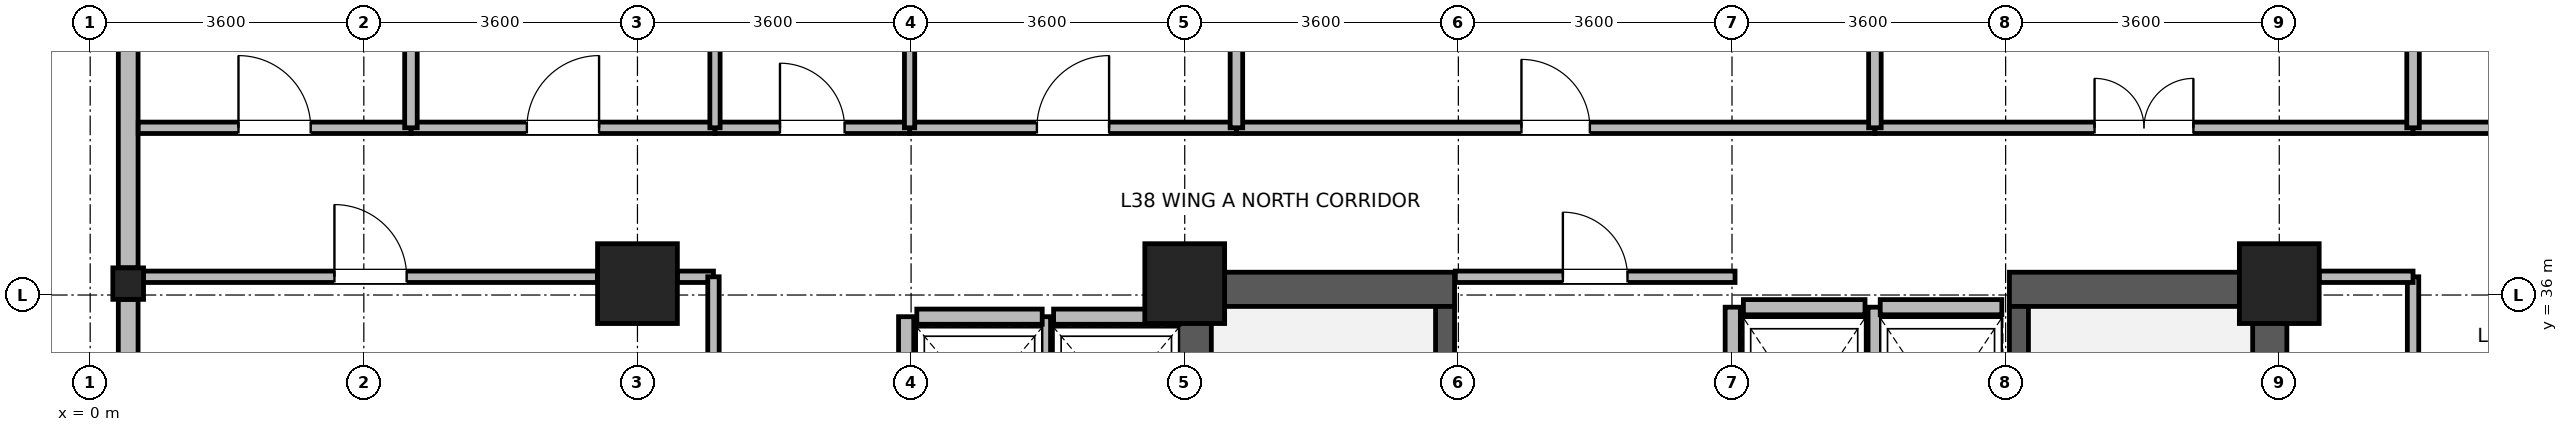
"""IFC4 building model, lengths in metres.
Left out: names, types, materials, properties, quantities, classifications, styles, units other than length and angle.
Written with IfcOpenShell. Run it as: python <this file> out.ifc"""

import sys

from ifc_helpers import new_model, si_unit, direction, frame, frame_2d, origin, origin_2d, place, context, subcontext, project, spatial, rectangle, i_section, extrude, source, transform, mapped, element, fill, save


model = new_model("IFC4")
c1 = context("Model", 3, precision=1e-05, world=origin(), true_north=direction((0.0, 1.0)))
c2 = subcontext(c1, "Body", "Model", "MODEL_VIEW")
j1 = project(units=[si_unit("LENGTHUNIT", "METRE"), si_unit("PLANEANGLEUNIT", "RADIAN")], contexts=[c1])
p1 = place(None, origin())
s1 = spatial("IfcSite", under=j1, at=p1, CompositionType="ELEMENT")
p2 = place(p1, origin())
s2 = spatial("IfcBuilding", under=s1, at=p2, CompositionType="ELEMENT")
p3 = place(p2, frame((0.0, 0.0, 151.3)))
s3 = spatial("IfcBuildingStorey", under=s2, at=p3, CompositionType="ELEMENT", Elevation=151.3)
for number, where, z_axis, x_axis in (
    (1, (14.525, 28.4, 0.0), (0.0, 0.0, 1.0), (0.0, 1.0, 0.0)),
    (2, (28.675, 28.4, 0.0), (0.0, 0.0, 1.0), (0.0, 1.0, 0.0)),
):
    element("IfcWall", number, at=place(p3, frame(where, z_axis=z_axis, x_axis=x_axis)), inside=s3, PredefinedType="SHEAR", context=c2, shape_type="SweptSolid", body=[
        extrude(rectangle(XDim=7.9, YDim=0.45, at=frame_2d((3.95, 0.0))), origin(), (0.0, 0.0, 1.0), 3.46),
    ])
for number, where, z_axis, x_axis in (
    (3, (14.75, 36.075, 0.0), (0.0, 0.0, 1.0), (1.0, 0.0, 0.0)),
    (4, (25.25, 36.075, 0.0), (0.0, 0.0, 1.0), (1.0, 0.0, 0.0)),
):
    element("IfcWall", number, at=place(p3, frame(where, z_axis=z_axis, x_axis=x_axis)), inside=s3, PredefinedType="SHEAR", context=c2, shape_type="SweptSolid", body=[
        extrude(rectangle(XDim=3.2, YDim=0.45, at=frame_2d((1.6, 0.0))), origin(), (0.0, 0.0, 1.0), 3.46),
    ])
p4 = place(p3, frame((17.825, 28.85, 0.0), z_axis=(0.0, 0.0, 1.0), x_axis=(0.0, 1.0, 0.0)))
e5 = element("IfcWall", 5, at=p4, inside=s3, PredefinedType="SHEAR", context=c2, shape_type="SweptSolid", body=[
    extrude(rectangle(XDim=7.0, YDim=0.25, at=frame_2d((3.5, 0.0))), origin(), (0.0, 0.0, 1.0), 3.46),
])
p5 = place(p4, frame((0.15, 0.0, 0.0)))
e6 = element("IfcOpeningElement", 6, at=p5, cuts=e5, PredefinedType="OPENING", context=c2, shape_type="SweptSolid", body=[
    extrude(rectangle(XDim=1.1, YDim=2.08, at=frame_2d((0.55, 1.04))), frame((0.0, 0.135, 0.0), z_axis=(0.0, -1.0, 0.0), x_axis=(1.0, 0.0, 0.0)), (0.0, 0.0, 1.0), 0.27),
])
p6 = place(p3, frame((25.375, 28.85, 0.0), z_axis=(0.0, 0.0, 1.0), x_axis=(0.0, 1.0, 0.0)))
e7 = element("IfcWall", 7, at=p6, inside=s3, PredefinedType="SHEAR", context=c2, shape_type="SweptSolid", body=[
    extrude(rectangle(XDim=7.0, YDim=0.25, at=frame_2d((3.5, 0.0))), origin(), (0.0, 0.0, 1.0), 3.46),
])
p7 = place(p6, frame((0.15, 0.0, 0.0)))
e8 = element("IfcOpeningElement", 8, at=p7, cuts=e7, PredefinedType="OPENING", context=c2, shape_type="SweptSolid", body=[
    extrude(rectangle(XDim=1.1, YDim=2.08, at=frame_2d((0.55, 1.04))), frame((0.0, 0.135, 0.0), z_axis=(0.0, -1.0, 0.0), x_axis=(1.0, 0.0, 0.0)), (0.0, 0.0, 1.0), 0.27),
])
m1 = source(origin(), c2, "Body", "SweptSolid", [
    extrude(rectangle(XDim=1.05, YDim=1.05, at=origin_2d()), origin(), (0.0, 0.0, 1.0), 3.7),
])
for number, where, z_axis, x_axis in (
    (9, (7.2, 36.15, 0.0), (0.0, 0.0, 1.0), (1.0, 0.0, 0.0)),
    (10, (14.4, 36.15, 0.0), (0.0, 0.0, 1.0), (1.0, 0.0, 0.0)),
    (11, (28.8, 36.15, 0.0), (0.0, 0.0, 1.0), (1.0, 0.0, 0.0)),
):
    element("IfcColumn", number, at=place(p3, frame(where, z_axis=z_axis, x_axis=x_axis)), inside=s3, PredefinedType="COLUMN", context=c2, shape_type="MappedRepresentation", body=[
        mapped(m1, transform((0.0, 0.0, 0.0), x_axis=(1.0, 0.0, 0.0), y_axis=(0.0, 1.0, 0.0), z_axis=(0.0, 0.0, 1.0), scale=1.0)),
    ])
m2 = source(origin(), c2, "Body", "SweptSolid", [
    extrude(i_section(OverallWidth=0.404, OverallDepth=0.414, WebThickness=0.021, FlangeThickness=0.028, FilletRadius=0.015, at=origin_2d()), origin(), (0.0, 0.0, 1.0), 3.7),
])
p8 = place(p3, frame((0.5, 36.15, 0.0), z_axis=(0.0, 0.0, 1.0), x_axis=(1.0, 0.0, 0.0)))
e12 = element("IfcColumn", 12, at=p8, inside=s3, PredefinedType="COLUMN", context=c2, shape_type="MappedRepresentation", body=[
    mapped(m2, transform((0.0, 0.0, 0.0), x_axis=(1.0, 0.0, 0.0), y_axis=(0.0, 1.0, 0.0), z_axis=(0.0, 0.0, 1.0), scale=1.0)),
])
p9 = place(p3, frame((0.5, 36.358, 0.0), z_axis=(0.0, 0.0, 1.0), x_axis=(0.0, 1.0, 0.0)))
e13 = element("IfcWall", 13, at=p9, inside=s3, PredefinedType="STANDARD", context=c2, shape_type="SweptSolid", body=[
    extrude(rectangle(XDim=6.972, YDim=0.26, at=frame_2d((3.486, 0.0))), origin(), (0.0, 0.0, 1.0), 3.44),
])
p10 = place(p9, frame((4.329, 0.0, 0.85)))
e14 = element("IfcOpeningElement", 14, at=p10, cuts=e13, PredefinedType="OPENING", context=c2, shape_type="SweptSolid", body=[
    extrude(rectangle(XDim=1.8, YDim=1.85, at=frame_2d((0.9, 0.925))), frame((0.0, 0.14, 0.0), z_axis=(0.0, -1.0, 0.0), x_axis=(1.0, 0.0, 0.0)), (0.0, 0.0, 1.0), 0.28),
])
p11 = place(p9, frame((3.011, 0.0, 0.85)))
e15 = element("IfcOpeningElement", 15, at=p11, cuts=e13, PredefinedType="OPENING", context=c2, shape_type="SweptSolid", body=[
    extrude(rectangle(XDim=0.95, YDim=1.75, at=frame_2d((0.475, 0.875))), frame((0.0, 0.14, 0.0), z_axis=(0.0, -1.0, 0.0), x_axis=(1.0, 0.0, 0.0)), (0.0, 0.0, 1.0), 0.28),
])
p12 = place(p3, frame((0.5, 28.858, 0.0), z_axis=(0.0, 0.0, 1.0), x_axis=(0.0, 1.0, 0.0)))
e16 = element("IfcWall", 16, at=p12, inside=s3, PredefinedType="STANDARD", context=c2, shape_type="SweptSolid", body=[
    extrude(rectangle(XDim=7.084, YDim=0.26, at=frame_2d((3.542, 0.0))), origin(), (0.0, 0.0, 1.0), 2.99),
])
p13 = place(p12, frame((0.871, 0.0, 0.85)))
e17 = element("IfcOpeningElement", 17, at=p13, cuts=e16, PredefinedType="OPENING", context=c2, shape_type="SweptSolid", body=[
    extrude(rectangle(XDim=1.8, YDim=1.85, at=frame_2d((0.9, 0.925))), frame((0.0, 0.14, 0.0), z_axis=(0.0, -1.0, 0.0), x_axis=(1.0, 0.0, 0.0)), (0.0, 0.0, 1.0), 0.28),
])
p14 = place(p12, frame((4.413, 0.0, 0.85)))
e18 = element("IfcOpeningElement", 18, at=p14, cuts=e16, PredefinedType="OPENING", context=c2, shape_type="SweptSolid", body=[
    extrude(rectangle(XDim=1.8, YDim=1.85, at=frame_2d((0.9, 0.925))), frame((0.0, 0.14, 0.0), z_axis=(0.0, -1.0, 0.0), x_axis=(1.0, 0.0, 0.0)), (0.0, 0.0, 1.0), 0.28),
])
p15 = place(p3, frame((12.675, 35.715, 0.0), z_axis=(0.0, 0.0, 1.0), x_axis=(1.0, 0.0, 0.0)))
e19 = element("IfcWall", 19, at=p15, inside=s3, PredefinedType="PARTITIONING", context=c2, shape_type="SweptSolid", body=[
    extrude(rectangle(XDim=1.65, YDim=0.2, at=frame_2d((0.825, 0.0))), origin(), (0.0, 0.0, 1.0), 3.44),
])
p16 = place(p3, frame((12.535, 33.485, 0.0), z_axis=(0.0, 0.0, 1.0), x_axis=(0.0, 1.0, 0.0)))
e20 = element("IfcWall", 20, at=p16, inside=s3, PredefinedType="PARTITIONING", context=c2, shape_type="SweptSolid", body=[
    extrude(rectangle(XDim=2.23, YDim=0.2, at=frame_2d((1.115, 0.0))), origin(), (0.0, 0.0, 1.0), 3.44),
])
p17 = place(p3, frame((10.875, 35.715, 0.0), z_axis=(0.0, 0.0, 1.0), x_axis=(1.0, 0.0, 0.0)))
e21 = element("IfcWall", 21, at=p17, inside=s3, PredefinedType="PARTITIONING", context=c2, shape_type="SweptSolid", body=[
    extrude(rectangle(XDim=1.65, YDim=0.2, at=frame_2d((0.825, 0.0))), origin(), (0.0, 0.0, 1.0), 3.44),
])
p18 = place(p3, frame((10.735, 33.485, 0.0), z_axis=(0.0, 0.0, 1.0), x_axis=(0.0, 1.0, 0.0)))
e22 = element("IfcWall", 22, at=p18, inside=s3, PredefinedType="PARTITIONING", context=c2, shape_type="SweptSolid", body=[
    extrude(rectangle(XDim=2.23, YDim=0.2, at=frame_2d((1.115, 0.0))), origin(), (0.0, 0.0, 1.0), 3.44),
])
p19 = place(p3, frame((21.75, 35.84, 0.0), z_axis=(0.0, 0.0, 1.0), x_axis=(1.0, 0.0, 0.0)))
e23 = element("IfcWall", 23, at=p19, inside=s3, PredefinedType="PARTITIONING", context=c2, shape_type="SweptSolid", body=[
    extrude(rectangle(XDim=1.6, YDim=0.2, at=frame_2d((0.8, 0.0))), origin(), (0.0, 0.0, 1.0), 2.44),
])
for number, where, z_axis, x_axis in (
    (24, (21.61, 33.16, 0.0), (0.0, 0.0, 1.0), (0.0, 1.0, 0.0)),
    (25, (23.49, 33.16, 0.0), (0.0, 0.0, 1.0), (0.0, 1.0, 0.0)),
):
    element("IfcWall", number, at=place(p3, frame(where, z_axis=z_axis, x_axis=x_axis)), inside=s3, PredefinedType="PARTITIONING", context=c2, shape_type="SweptSolid", body=[
        extrude(rectangle(XDim=2.68, YDim=0.2, at=frame_2d((1.34, 0.0))), origin(), (0.0, 0.0, 1.0), 3.44),
    ])
p20 = place(p3, frame((23.55, 35.84, 0.0), z_axis=(0.0, 0.0, 1.0), x_axis=(1.0, 0.0, 0.0)))
e26 = element("IfcWall", 26, at=p20, inside=s3, PredefinedType="PARTITIONING", context=c2, shape_type="SweptSolid", body=[
    extrude(rectangle(XDim=1.6, YDim=0.2, at=frame_2d((0.8, 0.0))), origin(), (0.0, 0.0, 1.0), 2.44),
])
p21 = place(p3, frame((15.08, 38.2, 0.0), z_axis=(0.0, 0.0, 1.0), x_axis=(1.0, 0.0, 0.0)))
e27 = element("IfcWall", 27, at=p21, inside=s3, PredefinedType="PARTITIONING", context=c2, shape_type="SweptSolid", body=[
    extrude(rectangle(XDim=8.4, YDim=0.15, at=frame_2d((4.2, 0.0))), origin(), (0.0, 0.0, 1.0), 3.44),
])
p22 = place(p21, frame((3.75, 0.0, 0.0)))
e28 = element("IfcOpeningElement", 28, at=p22, cuts=e27, PredefinedType="OPENING", context=c2, shape_type="SweptSolid", body=[
    extrude(rectangle(XDim=0.9, YDim=2.08, at=frame_2d((0.45, 1.04))), frame((0.0, 0.085, 0.0), z_axis=(0.0, -1.0, 0.0), x_axis=(1.0, 0.0, 0.0)), (0.0, 0.0, 1.0), 0.17),
])
p23 = place(p3, frame((0.702, 36.24, 0.0), z_axis=(0.0, 0.0, 1.0), x_axis=(1.0, 0.0, 0.0)))
e29 = element("IfcWall", 29, at=p23, inside=s3, PredefinedType="PARTITIONING", context=c2, shape_type="SweptSolid", body=[
    extrude(rectangle(XDim=5.973, YDim=0.15, at=frame_2d((2.987, 0.0))), origin(), (0.0, 0.0, 1.0), 2.84),
])
p24 = place(p23, frame((2.511, 0.0, 0.0)))
e30 = element("IfcOpeningElement", 30, at=p24, cuts=e29, PredefinedType="OPENING", context=c2, shape_type="SweptSolid", body=[
    extrude(rectangle(XDim=0.95, YDim=2.1, at=frame_2d((0.475, 1.05))), frame((0.0, 0.085, 0.0), z_axis=(0.0, -1.0, 0.0), x_axis=(1.0, 0.0, 0.0)), (0.0, 0.0, 1.0), 0.17),
])
p25 = place(p3, frame((7.725, 36.24, 0.0), z_axis=(0.0, 0.0, 1.0), x_axis=(1.0, 0.0, 0.0)))
e31 = element("IfcWall", 31, at=p25, inside=s3, PredefinedType="PARTITIONING", context=c2, shape_type="SweptSolid", body=[
    extrude(rectangle(XDim=0.475, YDim=0.15, at=frame_2d((0.237, 0.0))), origin(), (0.0, 0.0, 1.0), 2.84),
])
p26 = place(p3, frame((23.48, 38.2, 0.0), z_axis=(0.0, 0.0, 1.0), x_axis=(1.0, 0.0, 0.0)))
e32 = element("IfcWall", 32, at=p26, inside=s3, PredefinedType="PARTITIONING", context=c2, shape_type="SweptSolid", body=[
    extrude(rectangle(XDim=7.08, YDim=0.15, at=frame_2d((3.54, 0.0))), origin(), (0.0, 0.0, 1.0), 3.44),
])
p27 = place(p26, frame((2.89, 0.0, 0.0)))
e33 = element("IfcOpeningElement", 33, at=p27, cuts=e32, PredefinedType="OPENING", context=c2, shape_type="SweptSolid", body=[
    extrude(rectangle(XDim=1.3, YDim=2.12, at=frame_2d((0.65, 1.06))), frame((0.0, 0.085, 0.0), z_axis=(0.0, -1.0, 0.0), x_axis=(1.0, 0.0, 0.0)), (0.0, 0.0, 1.0), 0.17),
])
p28 = place(p3, frame((30.56, 38.2, 0.0), z_axis=(0.0, 0.0, 1.0), x_axis=(1.0, 0.0, 0.0)))
e34 = element("IfcWall", 34, at=p28, inside=s3, PredefinedType="PARTITIONING", context=c2, shape_type="SweptSolid", body=[
    extrude(rectangle(XDim=4.8, YDim=0.15, at=frame_2d((2.4, 0.0))), origin(), (0.0, 0.0, 1.0), 3.44),
])
p29 = place(p28, frame((1.75, 0.0, 0.0)))
e35 = element("IfcOpeningElement", 35, at=p29, cuts=e34, PredefinedType="OPENING", context=c2, shape_type="SweptSolid", body=[
    extrude(rectangle(XDim=1.3, YDim=2.12, at=frame_2d((0.65, 1.06))), frame((0.0, 0.085, 0.0), z_axis=(0.0, -1.0, 0.0), x_axis=(1.0, 0.0, 0.0)), (0.0, 0.0, 1.0), 0.17),
])
p30 = place(p3, frame((10.78, 38.2, 0.0), z_axis=(0.0, 0.0, 1.0), x_axis=(1.0, 0.0, 0.0)))
e36 = element("IfcWall", 36, at=p30, inside=s3, PredefinedType="PARTITIONING", context=c2, shape_type="SweptSolid", body=[
    extrude(rectangle(XDim=4.3, YDim=0.15, at=frame_2d((2.15, 0.0))), origin(), (0.0, 0.0, 1.0), 3.44),
])
p31 = place(p30, frame((1.675, 0.0, 0.0)))
e37 = element("IfcOpeningElement", 37, at=p31, cuts=e36, PredefinedType="OPENING", context=c2, shape_type="SweptSolid", body=[
    extrude(rectangle(XDim=0.95, YDim=2.1, at=frame_2d((0.475, 1.05))), frame((0.0, 0.085, 0.0), z_axis=(0.0, -1.0, 0.0), x_axis=(1.0, 0.0, 0.0)), (0.0, 0.0, 1.0), 0.17),
])
p32 = place(p3, frame((4.22, 38.2, 0.0), z_axis=(0.0, 0.0, 1.0), x_axis=(1.0, 0.0, 0.0)))
e38 = element("IfcWall", 38, at=p32, inside=s3, PredefinedType="PARTITIONING", context=c2, shape_type="SweptSolid", body=[
    extrude(rectangle(XDim=4.0, YDim=0.15, at=frame_2d((2.0, 0.0))), origin(), (0.0, 0.0, 1.0), 3.44),
])
p33 = place(p32, frame((1.525, 0.0, 0.0)))
e39 = element("IfcOpeningElement", 39, at=p33, cuts=e38, PredefinedType="OPENING", context=c2, shape_type="SweptSolid", body=[
    extrude(rectangle(XDim=0.95, YDim=2.1, at=frame_2d((0.475, 1.05))), frame((0.0, 0.085, 0.0), z_axis=(0.0, -1.0, 0.0), x_axis=(1.0, 0.0, 0.0)), (0.0, 0.0, 1.0), 0.17),
])
p34 = place(p3, frame((8.2, 32.4, 0.0), z_axis=(0.0, 0.0, 1.0), x_axis=(0.0, 1.0, 0.0)))
e40 = element("IfcWall", 40, at=p34, inside=s3, PredefinedType="PARTITIONING", context=c2, shape_type="SweptSolid", body=[
    extrude(rectangle(XDim=3.84, YDim=0.15, at=frame_2d((1.92, 0.0))), origin(), (0.0, 0.0, 1.0), 3.44),
])
p35 = place(p3, frame((30.56, 32.4, 0.0), z_axis=(0.0, 0.0, 1.0), x_axis=(0.0, 1.0, 0.0)))
e41 = element("IfcWall", 41, at=p35, inside=s3, PredefinedType="PARTITIONING", context=c2, shape_type="SweptSolid", body=[
    extrude(rectangle(XDim=3.84, YDim=0.15, at=frame_2d((1.92, 0.0))), origin(), (0.0, 0.0, 1.0), 3.44),
])
p36 = place(p35, frame((1.27, 0.0, 0.0)))
e42 = element("IfcOpeningElement", 42, at=p36, cuts=e41, PredefinedType="OPENING", context=c2, shape_type="SweptSolid", body=[
    extrude(rectangle(XDim=1.3, YDim=2.12, at=frame_2d((0.65, 1.06))), frame((0.0, 0.085, 0.0), z_axis=(0.0, -1.0, 0.0), x_axis=(1.0, 0.0, 0.0)), (0.0, 0.0, 1.0), 0.17),
])
p37 = place(p3, frame((0.632, 38.2, 0.0), z_axis=(0.0, 0.0, 1.0), x_axis=(1.0, 0.0, 0.0)))
e43 = element("IfcWall", 43, at=p37, inside=s3, PredefinedType="PARTITIONING", context=c2, shape_type="SweptSolid", body=[
    extrude(rectangle(XDim=3.588, YDim=0.15, at=frame_2d((1.794, 0.0))), origin(), (0.0, 0.0, 1.0), 3.44),
])
p38 = place(p37, frame((1.319, 0.0, 0.0)))
e44 = element("IfcOpeningElement", 44, at=p38, cuts=e43, PredefinedType="OPENING", context=c2, shape_type="SweptSolid", body=[
    extrude(rectangle(XDim=0.95, YDim=2.1, at=frame_2d((0.475, 1.05))), frame((0.0, 0.085, 0.0), z_axis=(0.0, -1.0, 0.0), x_axis=(1.0, 0.0, 0.0)), (0.0, 0.0, 1.0), 0.17),
])
p39 = place(p3, frame((17.96, 36.24, 0.0), z_axis=(0.0, 0.0, 1.0), x_axis=(1.0, 0.0, 0.0)))
e45 = element("IfcWall", 45, at=p39, inside=s3, PredefinedType="PARTITIONING", context=c2, shape_type="SweptSolid", body=[
    extrude(rectangle(XDim=3.68, YDim=0.15, at=frame_2d((1.84, 0.0))), origin(), (0.0, 0.0, 1.0), 2.44),
])
p40 = place(p39, frame((1.415, 0.0, 0.0)))
e46 = element("IfcOpeningElement", 46, at=p40, cuts=e45, PredefinedType="OPENING", context=c2, shape_type="SweptSolid", body=[
    extrude(rectangle(XDim=0.85, YDim=2.04, at=frame_2d((0.425, 1.02))), frame((0.0, 0.085, 0.0), z_axis=(0.0, -1.0, 0.0), x_axis=(1.0, 0.0, 0.0)), (0.0, 0.0, 1.0), 0.17),
])
p41 = place(p3, frame((8.22, 38.2, 0.0), z_axis=(0.0, 0.0, 1.0), x_axis=(1.0, 0.0, 0.0)))
e47 = element("IfcWall", 47, at=p41, inside=s3, PredefinedType="PARTITIONING", context=c2, shape_type="SweptSolid", body=[
    extrude(rectangle(XDim=2.56, YDim=0.15, at=frame_2d((1.28, 0.0))), origin(), (0.0, 0.0, 1.0), 3.44),
])
p42 = place(p41, frame((0.855, 0.0, 0.0)))
e48 = element("IfcOpeningElement", 48, at=p42, cuts=e47, PredefinedType="OPENING", context=c2, shape_type="SweptSolid", body=[
    extrude(rectangle(XDim=0.85, YDim=2.04, at=frame_2d((0.425, 1.02))), frame((0.0, 0.085, 0.0), z_axis=(0.0, -1.0, 0.0), x_axis=(1.0, 0.0, 0.0)), (0.0, 0.0, 1.0), 0.17),
])
p43 = place(p3, frame((29.325, 36.24, 0.0), z_axis=(0.0, 0.0, 1.0), x_axis=(1.0, 0.0, 0.0)))
e49 = element("IfcWall", 49, at=p43, inside=s3, PredefinedType="PARTITIONING", context=c2, shape_type="SweptSolid", body=[
    extrude(rectangle(XDim=1.235, YDim=0.15, at=frame_2d((0.618, 0.0))), origin(), (0.0, 0.0, 1.0), 2.84),
])
p44 = place(p3, frame((4.22, 38.2, 0.0), z_axis=(0.0, 0.0, 1.0), x_axis=(0.0, 1.0, 0.0)))
e50 = element("IfcWall", 50, at=p44, inside=s3, PredefinedType="PARTITIONING", context=c2, shape_type="SweptSolid", body=[
    extrude(rectangle(XDim=4.868, YDim=0.165, at=frame_2d((2.434, 0.0))), origin(), (0.0, 0.0, 1.0), 3.44),
])
for number, where, z_axis, x_axis in (
    (51, (8.22, 38.2, 0.0), (0.0, 0.0, 1.0), (0.0, 1.0, 0.0)),
    (52, (10.78, 38.2, 0.0), (0.0, 0.0, 1.0), (0.0, 1.0, 0.0)),
):
    element("IfcWall", number, at=place(p3, frame(where, z_axis=z_axis, x_axis=x_axis)), inside=s3, PredefinedType="PARTITIONING", context=c2, shape_type="SweptSolid", body=[
        extrude(rectangle(XDim=4.868, YDim=0.135, at=frame_2d((2.434, 0.0))), origin(), (0.0, 0.0, 1.0), 3.44),
    ])
for number, where, z_axis, x_axis in (
    (53, (15.08, 38.2, 0.0), (0.0, 0.0, 1.0), (0.0, 1.0, 0.0)),
    (54, (23.48, 38.2, 0.0), (0.0, 0.0, 1.0), (0.0, 1.0, 0.0)),
    (55, (30.56, 38.2, 0.0), (0.0, 0.0, 1.0), (0.0, 1.0, 0.0)),
):
    element("IfcWall", number, at=place(p3, frame(where, z_axis=z_axis, x_axis=x_axis)), inside=s3, PredefinedType="PARTITIONING", context=c2, shape_type="SweptSolid", body=[
        extrude(rectangle(XDim=4.868, YDim=0.165, at=frame_2d((2.434, 0.0))), origin(), (0.0, 0.0, 1.0), 3.44),
    ])
p45 = place(p22, origin())
e56 = element("IfcDoor", 56, at=p45, inside=s3, OperationType="SINGLE_SWING_LEFT", PredefinedType="DOOR", context=c2, shape_type="SweptSolid", body=[
    extrude(rectangle(XDim=0.9, YDim=2.08, at=frame_2d((0.45, 1.04))), frame((0.0, 0.025, 0.0), z_axis=(0.0, -1.0, 0.0), x_axis=(1.0, 0.0, 0.0)), (0.0, 0.0, 1.0), 0.05),
])
fill(e28, e56)
p46 = place(p24, origin())
e57 = element("IfcDoor", 57, at=p46, inside=s3, OperationType="SINGLE_SWING_LEFT", PredefinedType="DOOR", context=c2, shape_type="SweptSolid", body=[
    extrude(rectangle(XDim=0.95, YDim=2.1, at=frame_2d((0.475, 1.05))), frame((0.0, 0.025, 0.0), z_axis=(0.0, -1.0, 0.0), x_axis=(1.0, 0.0, 0.0)), (0.0, 0.0, 1.0), 0.05),
])
fill(e30, e57)
p47 = place(p27, origin())
e58 = element("IfcDoor", 58, at=p47, inside=s3, OperationType="DOUBLE_DOOR_SINGLE_SWING", PredefinedType="DOOR", context=c2, shape_type="SweptSolid", body=[
    extrude(rectangle(XDim=1.3, YDim=2.12, at=frame_2d((0.65, 1.06))), frame((0.0, 0.025, 0.0), z_axis=(0.0, -1.0, 0.0), x_axis=(1.0, 0.0, 0.0)), (0.0, 0.0, 1.0), 0.05),
])
fill(e33, e58)
p48 = place(p31, origin())
e59 = element("IfcDoor", 59, at=p48, inside=s3, OperationType="SINGLE_SWING_RIGHT", PredefinedType="DOOR", context=c2, shape_type="SweptSolid", body=[
    extrude(rectangle(XDim=0.95, YDim=2.1, at=frame_2d((0.475, 1.05))), frame((0.0, 0.025, 0.0), z_axis=(0.0, -1.0, 0.0), x_axis=(1.0, 0.0, 0.0)), (0.0, 0.0, 1.0), 0.05),
])
fill(e37, e59)
p49 = place(p33, origin())
e60 = element("IfcDoor", 60, at=p49, inside=s3, OperationType="SINGLE_SWING_RIGHT", PredefinedType="DOOR", context=c2, shape_type="SweptSolid", body=[
    extrude(rectangle(XDim=0.95, YDim=2.1, at=frame_2d((0.475, 1.05))), frame((0.0, 0.025, 0.0), z_axis=(0.0, -1.0, 0.0), x_axis=(1.0, 0.0, 0.0)), (0.0, 0.0, 1.0), 0.05),
])
fill(e39, e60)
p50 = place(p38, origin())
e61 = element("IfcDoor", 61, at=p50, inside=s3, OperationType="SINGLE_SWING_LEFT", PredefinedType="DOOR", context=c2, shape_type="SweptSolid", body=[
    extrude(rectangle(XDim=0.95, YDim=2.1, at=frame_2d((0.475, 1.05))), frame((0.0, 0.025, 0.0), z_axis=(0.0, -1.0, 0.0), x_axis=(1.0, 0.0, 0.0)), (0.0, 0.0, 1.0), 0.05),
])
fill(e44, e61)
p51 = place(p40, origin())
e62 = element("IfcDoor", 62, at=p51, inside=s3, OperationType="SINGLE_SWING_LEFT", PredefinedType="DOOR", context=c2, shape_type="SweptSolid", body=[
    extrude(rectangle(XDim=0.85, YDim=2.04, at=frame_2d((0.425, 1.02))), frame((0.0, 0.025, 0.0), z_axis=(0.0, -1.0, 0.0), x_axis=(1.0, 0.0, 0.0)), (0.0, 0.0, 1.0), 0.05),
])
fill(e46, e62)
p52 = place(p42, origin())
e63 = element("IfcDoor", 63, at=p52, inside=s3, OperationType="SINGLE_SWING_LEFT", PredefinedType="DOOR", context=c2, shape_type="SweptSolid", body=[
    extrude(rectangle(XDim=0.85, YDim=2.04, at=frame_2d((0.425, 1.02))), frame((0.0, 0.025, 0.0), z_axis=(0.0, -1.0, 0.0), x_axis=(1.0, 0.0, 0.0)), (0.0, 0.0, 1.0), 0.05),
])
fill(e48, e63)
save(model, sys.argv[1])
